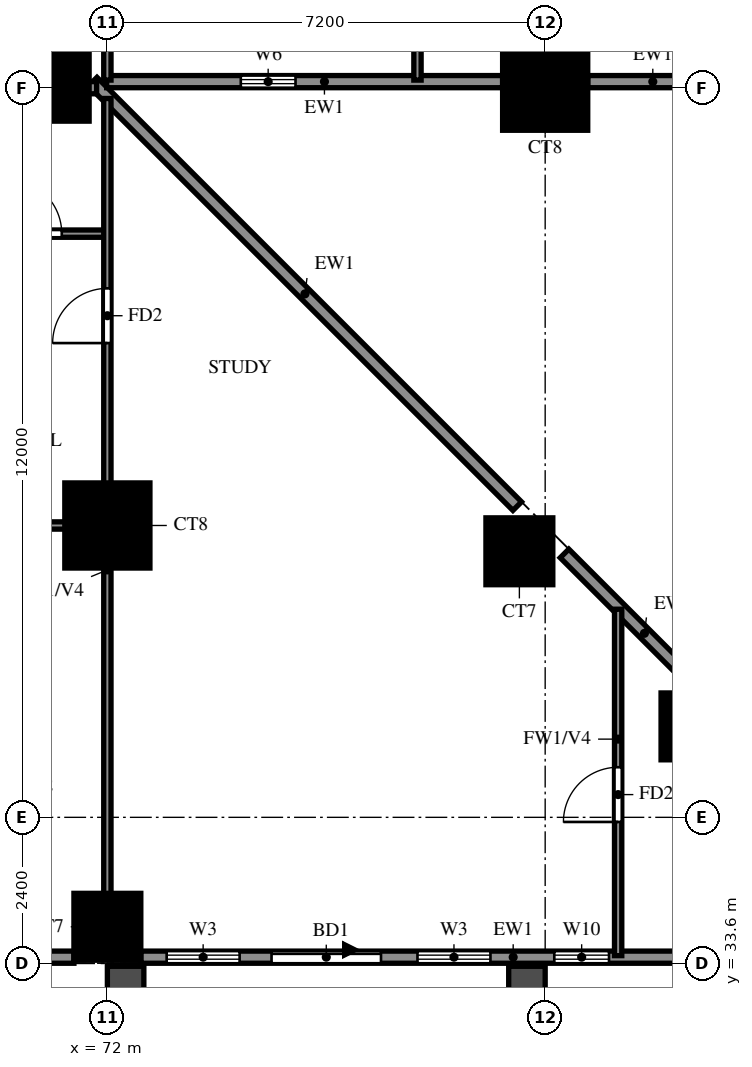
"""IFC4 building model, lengths in metres.
Left out: names, types, materials, properties, quantities, classifications, styles, units other than length and angle.
Written with IfcOpenShell. Run it as: python <this file> out.ifc"""

import sys

from ifc_helpers import new_model, si_unit, direction, frame, frame_2d, origin, origin_2d, place, context, subcontext, project, spatial, rectangle, extrude, source, transform, mapped, element, fill, save


model = new_model("IFC4")
c1 = context("Model", 3, precision=1e-05, world=origin(), true_north=direction((0.0, 1.0)))
c2 = subcontext(c1, "Body", "Model", "MODEL_VIEW")
j1 = project(units=[si_unit("LENGTHUNIT", "METRE"), si_unit("PLANEANGLEUNIT", "RADIAN")], contexts=[c1])
p1 = place(None, origin())
s1 = spatial("IfcSite", under=j1, at=p1, CompositionType="ELEMENT")
p2 = place(p1, origin())
s2 = spatial("IfcBuilding", under=s1, at=p2, CompositionType="ELEMENT")
p3 = place(p2, frame((0.0, 0.0, 34.0)))
s3 = spatial("IfcBuildingStorey", under=s2, at=p3, CompositionType="ELEMENT", Elevation=34.0)
m1 = source(origin(), c2, "Body", "SweptSolid", [
    extrude(rectangle(XDim=1.1, YDim=1.1, at=origin_2d()), origin(), (0.0, 0.0, 1.0), 3.18),
])
for number, where, z_axis, x_axis in (
    (1, (72.0, 34.2, 0.0), (0.0, 0.0, 1.0), (1.0, 0.0, 0.0)),
    (2, (81.656, 37.496, 0.0), (0.0, 0.0, 1.0), (1.0, 0.0, 0.0)),
    (3, (78.776, 40.376, 0.0), (0.0, 0.0, 1.0), (1.0, 0.0, 0.0)),
):
    element("IfcColumn", number, at=place(p3, frame(where, z_axis=z_axis, x_axis=x_axis)), inside=s3, PredefinedType="COLUMN", context=c2, shape_type="MappedRepresentation", body=[
        mapped(m1, transform((0.0, 0.0, 0.0))),
    ])
m2 = source(origin(), c2, "Body", "SweptSolid", [
    extrude(rectangle(XDim=1.4, YDim=1.4, at=origin_2d()), origin(), (0.0, 0.0, 1.0), 3.18),
])
p4 = place(p3, frame((72.0, 40.8, 0.0), z_axis=(0.0, 0.0, 1.0), x_axis=(1.0, 0.0, 0.0)))
e4 = element("IfcColumn", 4, at=p4, inside=s3, PredefinedType="COLUMN", context=c2, shape_type="MappedRepresentation", body=[
    mapped(m2, transform((0.0, 0.0, 0.0))),
])
p5 = place(p3, frame((71.15, 48.0, 0.0), z_axis=(0.0, 0.0, 1.0), x_axis=(1.0, 0.0, 0.0)))
e5 = element("IfcColumn", 5, at=p5, inside=s3, PredefinedType="COLUMN", context=c2, shape_type="MappedRepresentation", body=[
    mapped(m1, transform((0.0, 0.0, 0.0))),
])
p6 = place(p3, frame((79.2, 48.0, 0.0), z_axis=(0.0, 0.0, 1.0), x_axis=(1.0, 0.0, 0.0)))
e6 = element("IfcColumn", 6, at=p6, inside=s3, PredefinedType="COLUMN", context=c2, shape_type="MappedRepresentation", body=[
    mapped(m2, transform((0.0, 0.0, 0.0))),
])
p7 = place(p3, frame((81.62, 38.238, 0.0), z_axis=(0.0, 0.0, 1.0), x_axis=(-0.707106781187, 0.707106781187, 0.0)))
e7 = element("IfcWall", 7, at=p7, inside=s3, PredefinedType="SOLIDWALL", context=c2, shape_type="SweptSolid", body=[
    extrude(rectangle(XDim=2.973, YDim=0.2, at=frame_2d((1.486, 0.0))), origin(), (0.0, 0.0, 1.0), 3.18),
])
p8 = place(p3, frame((78.74, 41.118, 0.0), z_axis=(0.0, 0.0, 1.0), x_axis=(-0.707106781187, 0.707106781187, 0.0)))
e8 = element("IfcWall", 8, at=p8, inside=s3, PredefinedType="SOLIDWALL", context=c2, shape_type="SweptSolid", body=[
    extrude(rectangle(XDim=9.874, YDim=0.2, at=frame_2d((4.937, 0.0))), origin(), (0.0, 0.0, 1.0), 3.18),
])
p9 = place(p3, frame((71.989, 48.1, 0.0), z_axis=(0.0, 0.0, 1.0), x_axis=(1.0, 0.0, 0.0)))
e9 = element("IfcWall", 9, at=p9, inside=s3, PredefinedType="SOLIDWALL", context=c2, shape_type="SweptSolid", body=[
    extrude(rectangle(XDim=6.511, YDim=0.2, at=frame_2d((3.256, 0.0))), origin(), (0.0, 0.0, 1.0), 3.18),
])
p10 = place(p9, frame((2.206, 0.0, 1.5)))
e10 = element("IfcOpeningElement", 10, at=p10, cuts=e9, PredefinedType="OPENING", context=c2, shape_type="SweptSolid", body=[
    extrude(rectangle(XDim=0.9, YDim=0.9, at=frame_2d((0.45, 0.45))), frame((0.0, 0.11, 0.0), z_axis=(0.0, -1.0, 0.0), x_axis=(1.0, 0.0, 0.0)), (0.0, 0.0, 1.0), 0.22),
])
p11 = place(p3, frame((79.9, 48.1, 0.0), z_axis=(0.0, 0.0, 1.0), x_axis=(1.0, 0.0, 0.0)))
e11 = element("IfcWall", 11, at=p11, inside=s3, PredefinedType="SOLIDWALL", context=c2, shape_type="SweptSolid", body=[
    extrude(rectangle(XDim=5.35, YDim=0.2, at=frame_2d((2.675, 0.0))), origin(), (0.0, 0.0, 1.0), 3.18),
])
p12 = place(p11, frame((1.475, 0.0, 0.6)))
e12 = element("IfcOpeningElement", 12, at=p12, cuts=e11, PredefinedType="OPENING", context=c2, shape_type="SweptSolid", body=[
    extrude(rectangle(XDim=2.4, YDim=2.4, at=frame_2d((1.2, 1.2))), frame((0.0, 0.11, 0.0), z_axis=(0.0, -1.0, 0.0), x_axis=(1.0, 0.0, 0.0)), (0.0, 0.0, 1.0), 0.22),
])
p13 = place(p3, frame((65.35, 33.7, 0.0), z_axis=(0.0, 0.0, 1.0), x_axis=(1.0, 0.0, 0.0)))
e13 = element("IfcWall", 13, at=p13, inside=s3, PredefinedType="SOLIDWALL", context=c2, shape_type="SweptSolid", body=[
    extrude(rectangle(XDim=6.1, YDim=0.2, at=frame_2d((3.05, 0.0))), origin(), (0.0, 0.0, 1.0), 3.18),
])
p14 = place(p13, frame((3.575, 0.0, 0.6)))
e14 = element("IfcOpeningElement", 14, at=p14, cuts=e13, PredefinedType="OPENING", context=c2, shape_type="SweptSolid", body=[
    extrude(rectangle(XDim=1.8, YDim=2.4, at=frame_2d((0.9, 1.2))), frame((0.0, 0.11, 0.0), z_axis=(0.0, -1.0, 0.0), x_axis=(1.0, 0.0, 0.0)), (0.0, 0.0, 1.0), 0.22),
])
p15 = place(p13, frame((0.725, 0.0, 0.6)))
e15 = element("IfcOpeningElement", 15, at=p15, cuts=e13, PredefinedType="OPENING", context=c2, shape_type="SweptSolid", body=[
    extrude(rectangle(XDim=1.8, YDim=2.4, at=frame_2d((0.9, 1.2))), frame((0.0, 0.11, 0.0), z_axis=(0.0, -1.0, 0.0), x_axis=(1.0, 0.0, 0.0)), (0.0, 0.0, 1.0), 0.22),
])
p16 = place(p3, frame((72.55, 33.7, 0.0), z_axis=(0.0, 0.0, 1.0), x_axis=(1.0, 0.0, 0.0)))
e16 = element("IfcWall", 16, at=p16, inside=s3, PredefinedType="SOLIDWALL", context=c2, shape_type="SweptSolid", body=[
    extrude(rectangle(XDim=13.609, YDim=0.2, at=frame_2d((6.804, 0.0))), origin(), (0.0, 0.0, 1.0), 3.18),
])
p17 = place(p16, frame((2.15, 0.0, 0.0)))
e17 = element("IfcOpeningElement", 17, at=p17, cuts=e16, PredefinedType="OPENING", context=c2, shape_type="SweptSolid", body=[
    extrude(rectangle(XDim=1.8, YDim=2.4, at=frame_2d((0.9, 1.2))), frame((0.0, 0.11, 0.0), z_axis=(0.0, -1.0, 0.0), x_axis=(1.0, 0.0, 0.0)), (0.0, 0.0, 1.0), 0.22),
])
p18 = place(p16, frame((0.425, 0.0, 0.6)))
e18 = element("IfcOpeningElement", 18, at=p18, cuts=e16, PredefinedType="OPENING", context=c2, shape_type="SweptSolid", body=[
    extrude(rectangle(XDim=1.2, YDim=2.4, at=frame_2d((0.6, 1.2))), frame((0.0, 0.11, 0.0), z_axis=(0.0, -1.0, 0.0), x_axis=(1.0, 0.0, 0.0)), (0.0, 0.0, 1.0), 0.22),
])
p19 = place(p16, frame((4.55, 0.0, 0.6)))
e19 = element("IfcOpeningElement", 19, at=p19, cuts=e16, PredefinedType="OPENING", context=c2, shape_type="SweptSolid", body=[
    extrude(rectangle(XDim=1.2, YDim=2.4, at=frame_2d((0.6, 1.2))), frame((0.0, 0.11, 0.0), z_axis=(0.0, -1.0, 0.0), x_axis=(1.0, 0.0, 0.0)), (0.0, 0.0, 1.0), 0.22),
])
p20 = place(p16, frame((6.8, 0.0, 0.6)))
e20 = element("IfcOpeningElement", 20, at=p20, cuts=e16, PredefinedType="OPENING", context=c2, shape_type="SweptSolid", body=[
    extrude(rectangle(XDim=0.9, YDim=2.4, at=frame_2d((0.45, 1.2))), frame((0.0, 0.11, 0.0), z_axis=(0.0, -1.0, 0.0), x_axis=(1.0, 0.0, 0.0)), (0.0, 0.0, 1.0), 0.22),
])
p21 = place(p16, frame((9.429, 0.0, 0.6)))
e21 = element("IfcOpeningElement", 21, at=p21, cuts=e16, PredefinedType="OPENING", context=c2, shape_type="SweptSolid", body=[
    extrude(rectangle(XDim=2.4, YDim=2.4, at=frame_2d((1.2, 1.2))), frame((0.0, 0.11, 0.0), z_axis=(0.0, -1.0, 0.0), x_axis=(1.0, 0.0, 0.0)), (0.0, 0.0, 1.0), 0.22),
])
for number, where, z_axis, x_axis in (
    (22, (72.3, 33.55, 0.0), (0.0, 0.0, 1.0), (0.0, -1.0, 0.0)),
    (23, (78.9, 33.55, 0.0), (0.0, 0.0, 1.0), (0.0, -1.0, 0.0)),
):
    element("IfcWall", number, at=place(p3, frame(where, z_axis=z_axis, x_axis=x_axis)), inside=s3, PredefinedType="SOLIDWALL", context=c2, shape_type="SweptSolid", body=[
        extrude(rectangle(XDim=2.65, YDim=0.6, at=frame_2d((1.325, 0.0))), origin(), (0.0, 0.0, 1.0), 2.85),
    ])
p22 = place(p3, frame((67.2, 48.0, 0.0), z_axis=(0.0, 0.0, 1.0), x_axis=(1.0, 0.0, 0.0)))
e24 = element("IfcWall", 24, at=p22, inside=s3, PredefinedType="SOLIDWALL", context=c2, shape_type="SweptSolid", body=[
    extrude(rectangle(XDim=4.623, YDim=0.2, at=frame_2d((2.312, 0.0))), origin(), (0.0, 0.0, 1.0), 3.18),
])
p23 = place(p3, frame((60.0, 40.8, 0.0), z_axis=(0.0, 0.0, 1.0), x_axis=(1.0, 0.0, 0.0)))
e25 = element("IfcWall", 25, at=p23, inside=s3, PredefinedType="PARTITIONING", context=c2, shape_type="SweptSolid", body=[
    extrude(rectangle(XDim=12.0, YDim=0.12, at=frame_2d((6.0, 0.0))), origin(), (0.0, 0.0, 1.0), 3.18),
])
p24 = place(p23, frame((9.75, 0.0, 0.0)))
e26 = element("IfcOpeningElement", 26, at=p24, cuts=e25, PredefinedType="OPENING", context=c2, shape_type="SweptSolid", body=[
    extrude(rectangle(XDim=0.9, YDim=2.1, at=frame_2d((0.45, 1.05))), frame((0.0, 0.07, 0.0), z_axis=(0.0, -1.0, 0.0), x_axis=(1.0, 0.0, 0.0)), (0.0, 0.0, 1.0), 0.14),
])
p25 = place(p23, frame((2.55, 0.0, 0.0)))
e27 = element("IfcOpeningElement", 27, at=p25, cuts=e25, PredefinedType="OPENING", context=c2, shape_type="SweptSolid", body=[
    extrude(rectangle(XDim=1.5, YDim=2.1, at=frame_2d((0.75, 1.05))), frame((0.0, 0.07, 0.0), z_axis=(0.0, -1.0, 0.0), x_axis=(1.0, 0.0, 0.0)), (0.0, 0.0, 1.0), 0.14),
])
p26 = place(p3, frame((67.2, 45.6, 0.0), z_axis=(0.0, 0.0, 1.0), x_axis=(1.0, 0.0, 0.0)))
e28 = element("IfcWall", 28, at=p26, inside=s3, PredefinedType="PARTITIONING", context=c2, shape_type="SweptSolid", body=[
    extrude(rectangle(XDim=4.8, YDim=0.12, at=frame_2d((2.4, 0.0))), origin(), (0.0, 0.0, 1.0), 3.18),
])
p27 = place(p26, frame((3.15, 0.0, 0.0)))
e29 = element("IfcOpeningElement", 29, at=p27, cuts=e28, PredefinedType="OPENING", context=c2, shape_type="SweptSolid", body=[
    extrude(rectangle(XDim=0.9, YDim=2.1, at=frame_2d((0.45, 1.05))), frame((0.0, 0.07, 0.0), z_axis=(0.0, -1.0, 0.0), x_axis=(1.0, 0.0, 0.0)), (0.0, 0.0, 1.0), 0.14),
])
p28 = place(p3, frame((72.0, 33.725, 0.0), z_axis=(0.0, 0.0, 1.0), x_axis=(0.0, 1.0, 0.0)))
e30 = element("IfcWall", 30, at=p28, inside=s3, PredefinedType="PARTITIONING", context=c2, shape_type="SweptSolid", body=[
    extrude(rectangle(XDim=14.098, YDim=0.12, at=frame_2d((7.049, 0.0))), origin(), (0.0, 0.0, 1.0), 2.28),
])
p29 = place(p28, frame((10.075, 0.0, 0.0)))
e31 = element("IfcOpeningElement", 31, at=p29, cuts=e30, PredefinedType="OPENING", context=c2, shape_type="SweptSolid", body=[
    extrude(rectangle(XDim=0.9, YDim=2.1, at=frame_2d((0.45, 1.05))), frame((0.0, 0.07, 0.0), z_axis=(0.0, -1.0, 0.0), x_axis=(1.0, 0.0, 0.0)), (0.0, 0.0, 1.0), 0.14),
])
for number, where, z_axis, x_axis in (
    (32, (72.0, 48.125, 0.0), (0.0, 0.0, 1.0), (0.0, 1.0, 0.0)),
    (33, (77.1, 48.125, 0.0), (0.0, 0.0, 1.0), (0.0, 1.0, 0.0)),
):
    element("IfcWall", number, at=place(p3, frame(where, z_axis=z_axis, x_axis=x_axis)), inside=s3, PredefinedType="PARTITIONING", context=c2, shape_type="SweptSolid", body=[
        extrude(rectangle(XDim=3.475, YDim=0.12, at=frame_2d((1.738, 0.0))), origin(), (0.0, 0.0, 1.0), 3.18),
    ])
p30 = place(p3, frame((79.2, 48.125, 0.0), z_axis=(0.0, 0.0, 1.0), x_axis=(0.0, 1.0, 0.0)))
e34 = element("IfcWall", 34, at=p30, inside=s3, PredefinedType="PARTITIONING", context=c2, shape_type="SweptSolid", body=[
    extrude(rectangle(XDim=3.475, YDim=0.12, at=frame_2d((1.738, 0.0))), origin(), (0.0, 0.0, 1.0), 3.18),
])
p31 = place(p30, frame((1.288, 0.0, 0.0)))
e35 = element("IfcOpeningElement", 35, at=p31, cuts=e34, PredefinedType="OPENING", context=c2, shape_type="SweptSolid", body=[
    extrude(rectangle(XDim=0.9, YDim=2.1, at=frame_2d((0.45, 1.05))), frame((0.0, 0.07, 0.0), z_axis=(0.0, -1.0, 0.0), x_axis=(1.0, 0.0, 0.0)), (0.0, 0.0, 1.0), 0.14),
])
p32 = place(p3, frame((80.4, 33.725, 0.0), z_axis=(0.0, 0.0, 1.0), x_axis=(0.0, 1.0, 0.0)))
e36 = element("IfcWall", 36, at=p32, inside=s3, PredefinedType="PARTITIONING", context=c2, shape_type="SweptSolid", body=[
    extrude(rectangle(XDim=5.698, YDim=0.12, at=frame_2d((2.849, 0.0))), origin(), (0.0, 0.0, 1.0), 2.28),
])
p33 = place(p32, frame((2.199, 0.0, 0.0)))
e37 = element("IfcOpeningElement", 37, at=p33, cuts=e36, PredefinedType="OPENING", context=c2, shape_type="SweptSolid", body=[
    extrude(rectangle(XDim=0.9, YDim=2.1, at=frame_2d((0.45, 1.05))), frame((0.0, 0.07, 0.0), z_axis=(0.0, -1.0, 0.0), x_axis=(1.0, 0.0, 0.0)), (0.0, 0.0, 1.0), 0.14),
])
p34 = place(p10, origin())
e38 = element("IfcWindow", 38, at=p34, inside=s3, PartitioningType="SINGLE_PANEL", PredefinedType="WINDOW", context=c2, shape_type="SweptSolid", body=[
    extrude(rectangle(XDim=0.9, YDim=0.9, at=frame_2d((0.45, 0.45))), frame((0.0, 0.03, 0.0), z_axis=(0.0, -1.0, 0.0), x_axis=(1.0, 0.0, 0.0)), (0.0, 0.0, 1.0), 0.06),
])
fill(e10, e38)
p35 = place(p17, origin())
e39 = element("IfcDoor", 39, at=p35, inside=s3, OperationType="DOUBLE_DOOR_SLIDING", PredefinedType="DOOR", context=c2, shape_type="SweptSolid", body=[
    extrude(rectangle(XDim=1.8, YDim=2.4, at=frame_2d((0.9, 1.2))), frame((0.0, 0.025, 0.0), z_axis=(0.0, -1.0, 0.0), x_axis=(1.0, 0.0, 0.0)), (0.0, 0.0, 1.0), 0.05),
])
fill(e17, e39)
p36 = place(p18, origin())
e40 = element("IfcWindow", 40, at=p36, inside=s3, PartitioningType="SINGLE_PANEL", PredefinedType="WINDOW", context=c2, shape_type="SweptSolid", body=[
    extrude(rectangle(XDim=1.2, YDim=2.4, at=frame_2d((0.6, 1.2))), frame((0.0, 0.03, 0.0), z_axis=(0.0, -1.0, 0.0), x_axis=(1.0, 0.0, 0.0)), (0.0, 0.0, 1.0), 0.06),
])
fill(e18, e40)
p37 = place(p19, origin())
e41 = element("IfcWindow", 41, at=p37, inside=s3, PartitioningType="SINGLE_PANEL", PredefinedType="WINDOW", context=c2, shape_type="SweptSolid", body=[
    extrude(rectangle(XDim=1.2, YDim=2.4, at=frame_2d((0.6, 1.2))), frame((0.0, 0.03, 0.0), z_axis=(0.0, -1.0, 0.0), x_axis=(1.0, 0.0, 0.0)), (0.0, 0.0, 1.0), 0.06),
])
fill(e19, e41)
p38 = place(p20, origin())
e42 = element("IfcWindow", 42, at=p38, inside=s3, PartitioningType="SINGLE_PANEL", PredefinedType="WINDOW", context=c2, shape_type="SweptSolid", body=[
    extrude(rectangle(XDim=0.9, YDim=2.4, at=frame_2d((0.45, 1.2))), frame((0.0, 0.03, 0.0), z_axis=(0.0, -1.0, 0.0), x_axis=(1.0, 0.0, 0.0)), (0.0, 0.0, 1.0), 0.06),
])
fill(e20, e42)
p39 = place(p27, origin())
e43 = element("IfcDoor", 43, at=p39, inside=s3, OperationType="SINGLE_SWING_LEFT", PredefinedType="DOOR", context=c2, shape_type="SweptSolid", body=[
    extrude(rectangle(XDim=0.9, YDim=2.1, at=frame_2d((0.45, 1.05))), frame((0.0, 0.025, 0.0), z_axis=(0.0, -1.0, 0.0), x_axis=(1.0, 0.0, 0.0)), (0.0, 0.0, 1.0), 0.05),
])
fill(e29, e43)
p40 = place(p29, origin())
e44 = element("IfcDoor", 44, at=p40, inside=s3, OperationType="SINGLE_SWING_RIGHT", PredefinedType="DOOR", context=c2, shape_type="SweptSolid", body=[
    extrude(rectangle(XDim=0.9, YDim=2.1, at=frame_2d((0.45, 1.05))), frame((0.0, 0.025, 0.0), z_axis=(0.0, -1.0, 0.0), x_axis=(1.0, 0.0, 0.0)), (0.0, 0.0, 1.0), 0.05),
])
fill(e31, e44)
p41 = place(p33, origin())
e45 = element("IfcDoor", 45, at=p41, inside=s3, OperationType="SINGLE_SWING_RIGHT", PredefinedType="DOOR", context=c2, shape_type="SweptSolid", body=[
    extrude(rectangle(XDim=0.9, YDim=2.1, at=frame_2d((0.45, 1.05))), frame((0.0, 0.025, 0.0), z_axis=(0.0, -1.0, 0.0), x_axis=(1.0, 0.0, 0.0)), (0.0, 0.0, 1.0), 0.05),
])
fill(e37, e45)
save(model, sys.argv[1])
